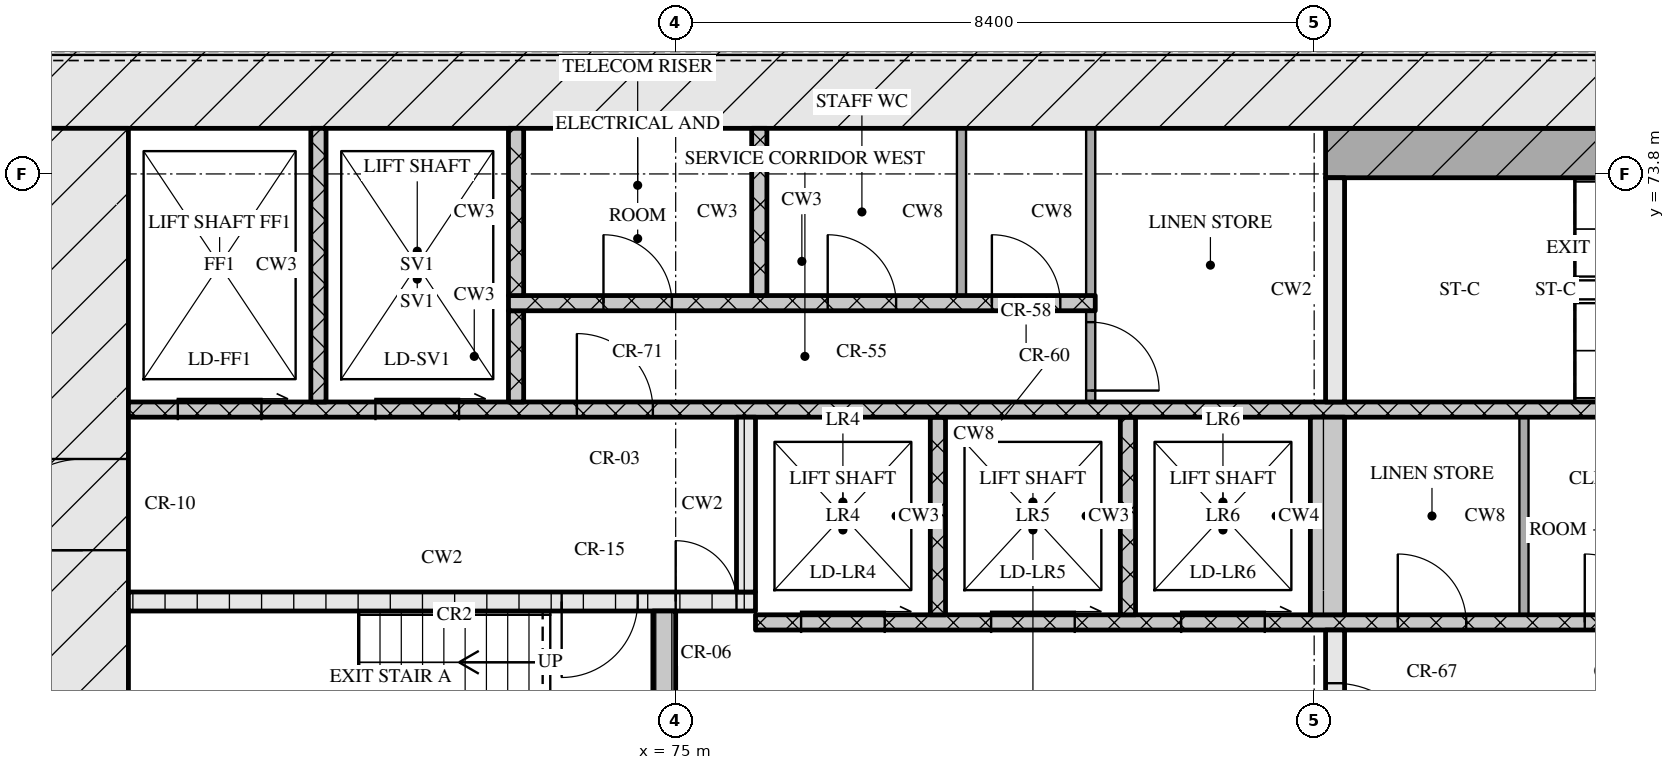
"""IFC4 building model, lengths in metres.
Left out: names, types, materials, properties, quantities, classifications, styles, units other than length and angle.
Written with IfcOpenShell. Run it as: python <this file> out.ifc"""

import sys

from ifc_helpers import new_model, si_unit, direction, frame, frame_2d, origin, place, context, subcontext, project, spatial, rectangle, extrude, element, fill, save


model = new_model("IFC4")
c1 = context("Model", 3, precision=1e-05, world=origin(), true_north=direction((0.0, 1.0)))
c2 = subcontext(c1, "Body", "Model", "MODEL_VIEW")
j1 = project(units=[si_unit("LENGTHUNIT", "METRE"), si_unit("PLANEANGLEUNIT", "RADIAN")], contexts=[c1])
p1 = place(None, origin())
s1 = spatial("IfcSite", under=j1, at=p1, CompositionType="ELEMENT")
p2 = place(p1, origin())
s2 = spatial("IfcBuilding", under=s1, at=p2, CompositionType="ELEMENT")
p3 = place(p2, frame((0.0, 0.0, 58.8)))
s3 = spatial("IfcBuildingStorey", under=s2, at=p3, CompositionType="ELEMENT", Elevation=58.8)
p4 = place(p3, frame((66.6, 75.0, 0.0), z_axis=(0.0, 0.0, 1.0), x_axis=(1.0, 0.0, 0.0)))
e1 = element("IfcWall", 1, at=p4, inside=s3, PredefinedType="SOLIDWALL", context=c2, shape_type="SweptSolid", body=[
    extrude(rectangle(XDim=42.0, YDim=1.2, at=frame_2d((21.0, 0.0))), origin(), (0.0, 0.0, 1.0), 3.32),
])
p5 = place(p3, frame((67.2, 62.4, 0.0), z_axis=(0.0, 0.0, 1.0), x_axis=(0.0, 1.0, 0.0)))
e2 = element("IfcWall", 2, at=p5, inside=s3, PredefinedType="SOLIDWALL", context=c2, shape_type="SweptSolid", body=[
    extrude(rectangle(XDim=12.0, YDim=1.2, at=frame_2d((6.0, 0.0))), origin(), (0.0, 0.0, 1.0), 3.32),
])
p6 = place(p5, frame((6.45, 0.0, 0.0)))
e3 = element("IfcOpeningElement", 3, at=p6, cuts=e2, PredefinedType="OPENING", context=c2, shape_type="SweptSolid", body=[
    extrude(rectangle(XDim=1.2, YDim=2.1, at=frame_2d((0.6, 1.05))), frame((0.0, 0.61, 0.0), z_axis=(0.0, -1.0, 0.0), x_axis=(1.0, 0.0, 0.0)), (0.0, 0.0, 1.0), 1.22),
])
p7 = place(p3, frame((74.85, 65.2, 0.0), z_axis=(0.0, 0.0, 1.0), x_axis=(0.0, 1.0, 0.0)))
e4 = element("IfcWall", 4, at=p7, inside=s3, PredefinedType="SOLIDWALL", context=c2, shape_type="SweptSolid", body=[
    extrude(rectangle(XDim=2.85, YDim=0.3, at=frame_2d((1.425, 0.0))), origin(), (0.0, 0.0, 1.0), 3.32),
])
p8 = place(p3, frame((83.675, 65.2, 0.0), z_axis=(0.0, 0.0, 1.0), x_axis=(0.0, 1.0, 0.0)))
e5 = element("IfcWall", 5, at=p8, inside=s3, PredefinedType="SOLIDWALL", context=c2, shape_type="SweptSolid", body=[
    extrude(rectangle(XDim=2.6, YDim=0.25, at=frame_2d((1.3, 0.0))), origin(), (0.0, 0.0, 1.0), 3.32),
])
p9 = place(p8, frame((0.7, 0.0, 0.0)))
e6 = element("IfcOpeningElement", 6, at=p9, cuts=e5, PredefinedType="OPENING", context=c2, shape_type="SweptSolid", body=[
    extrude(rectangle(XDim=1.2, YDim=2.1, at=frame_2d((0.6, 1.05))), frame((0.0, 0.135, 0.0), z_axis=(0.0, -1.0, 0.0), x_axis=(1.0, 0.0, 0.0)), (0.0, 0.0, 1.0), 0.27),
])
p10 = place(p3, frame((76.05, 67.9, 0.0), z_axis=(0.0, 0.0, 1.0), x_axis=(1.0, 0.0, 0.0)))
e7 = element("IfcWall", 7, at=p10, inside=s3, PredefinedType="SOLIDWALL", context=c2, shape_type="SweptSolid", body=[
    extrude(rectangle(XDim=23.1, YDim=0.2, at=frame_2d((11.55, 0.0))), origin(), (0.0, 0.0, 1.0), 3.32),
])
p11 = place(p10, frame((0.6, 0.0, 0.0)))
e8 = element("IfcOpeningElement", 8, at=p11, cuts=e7, PredefinedType="OPENING", context=c2, shape_type="SweptSolid", body=[
    extrude(rectangle(XDim=1.1, YDim=2.1, at=frame_2d((0.55, 1.05))), frame((0.0, 0.11, 0.0), z_axis=(0.0, -1.0, 0.0), x_axis=(1.0, 0.0, 0.0)), (0.0, 0.0, 1.0), 0.22),
])
p12 = place(p10, frame((3.1, 0.0, 0.0)))
e9 = element("IfcOpeningElement", 9, at=p12, cuts=e7, PredefinedType="OPENING", context=c2, shape_type="SweptSolid", body=[
    extrude(rectangle(XDim=1.1, YDim=2.1, at=frame_2d((0.55, 1.05))), frame((0.0, 0.11, 0.0), z_axis=(0.0, -1.0, 0.0), x_axis=(1.0, 0.0, 0.0)), (0.0, 0.0, 1.0), 0.22),
])
p13 = place(p10, frame((5.6, 0.0, 0.0)))
e10 = element("IfcOpeningElement", 10, at=p13, cuts=e7, PredefinedType="OPENING", context=c2, shape_type="SweptSolid", body=[
    extrude(rectangle(XDim=1.1, YDim=2.1, at=frame_2d((0.55, 1.05))), frame((0.0, 0.11, 0.0), z_axis=(0.0, -1.0, 0.0), x_axis=(1.0, 0.0, 0.0)), (0.0, 0.0, 1.0), 0.22),
])
p14 = place(p10, frame((8.45, 0.0, 0.0)))
e11 = element("IfcOpeningElement", 11, at=p14, cuts=e7, PredefinedType="OPENING", context=c2, shape_type="SweptSolid", body=[
    extrude(rectangle(XDim=0.9, YDim=2.1, at=frame_2d((0.45, 1.05))), frame((0.0, 0.11, 0.0), z_axis=(0.0, -1.0, 0.0), x_axis=(1.0, 0.0, 0.0)), (0.0, 0.0, 1.0), 0.22),
])
p15 = place(p10, frame((10.91, 0.0, 0.0)))
e12 = element("IfcOpeningElement", 12, at=p15, cuts=e7, PredefinedType="OPENING", context=c2, shape_type="SweptSolid", body=[
    extrude(rectangle(XDim=0.9, YDim=2.1, at=frame_2d((0.45, 1.05))), frame((0.0, 0.11, 0.0), z_axis=(0.0, -1.0, 0.0), x_axis=(1.0, 0.0, 0.0)), (0.0, 0.0, 1.0), 0.22),
])
p16 = place(p10, frame((13.55, 0.0, 0.0)))
e13 = element("IfcOpeningElement", 13, at=p16, cuts=e7, PredefinedType="OPENING", context=c2, shape_type="SweptSolid", body=[
    extrude(rectangle(XDim=1.0, YDim=2.1, at=frame_2d((0.5, 1.05))), frame((0.0, 0.11, 0.0), z_axis=(0.0, -1.0, 0.0), x_axis=(1.0, 0.0, 0.0)), (0.0, 0.0, 1.0), 0.22),
])
for number, where, z_axis, x_axis in (
    (14, (78.45, 68.0, 0.0), (0.0, 0.0, 1.0), (0.0, 1.0, 0.0)),
    (15, (80.95, 68.0, 0.0), (0.0, 0.0, 1.0), (0.0, 1.0, 0.0)),
):
    element("IfcWall", number, at=place(p3, frame(where, z_axis=z_axis, x_axis=x_axis)), inside=s3, PredefinedType="SOLIDWALL", context=c2, shape_type="SweptSolid", body=[
        extrude(rectangle(XDim=2.6, YDim=0.2, at=frame_2d((1.3, 0.0))), origin(), (0.0, 0.0, 1.0), 3.32),
    ])
p17 = place(p3, frame((83.575, 68.0, 0.0), z_axis=(0.0, 0.0, 1.0), x_axis=(0.0, 1.0, 0.0)))
e16 = element("IfcWall", 16, at=p17, inside=s3, PredefinedType="SOLIDWALL", context=c2, shape_type="SweptSolid", body=[
    extrude(rectangle(XDim=2.6, YDim=0.45, at=frame_2d((1.3, 0.0))), origin(), (0.0, 0.0, 1.0), 3.32),
])
p18 = place(p3, frame((86.16, 68.0, 0.0), z_axis=(0.0, 0.0, 1.0), x_axis=(0.0, 1.0, 0.0)))
e17 = element("IfcWall", 17, at=p18, inside=s3, PredefinedType="PARTITIONING", context=c2, shape_type="SweptSolid", body=[
    extrude(rectangle(XDim=2.6, YDim=0.12, at=frame_2d((1.3, 0.0))), origin(), (0.0, 0.0, 1.0), 3.32),
])
p19 = place(p3, frame((67.8, 68.175, 0.0), z_axis=(0.0, 0.0, 1.0), x_axis=(1.0, 0.0, 0.0)))
e18 = element("IfcWall", 18, at=p19, inside=s3, PredefinedType="SOLIDWALL", context=c2, shape_type="SweptSolid", body=[
    extrude(rectangle(XDim=8.25, YDim=0.25, at=frame_2d((4.125, 0.0))), origin(), (0.0, 0.0, 1.0), 3.32),
])
p20 = place(p19, frame((5.7, 0.0, 0.0)))
e19 = element("IfcOpeningElement", 19, at=p20, cuts=e18, PredefinedType="OPENING", context=c2, shape_type="SweptSolid", body=[
    extrude(rectangle(XDim=1.0, YDim=2.1, at=frame_2d((0.5, 1.05))), frame((0.0, 0.135, 0.0), z_axis=(0.0, -1.0, 0.0), x_axis=(1.0, 0.0, 0.0)), (0.0, 0.0, 1.0), 0.27),
])
p21 = place(p19, frame((7.2, 0.0, 0.0)))
e20 = element("IfcOpeningElement", 20, at=p21, cuts=e18, PredefinedType="OPENING", context=c2, shape_type="SweptSolid", body=[
    extrude(rectangle(XDim=0.8, YDim=2.1, at=frame_2d((0.4, 1.05))), frame((0.0, 0.135, 0.0), z_axis=(0.0, -1.0, 0.0), x_axis=(1.0, 0.0, 0.0)), (0.0, 0.0, 1.0), 0.27),
])
p22 = place(p3, frame((75.925, 68.3, 0.0), z_axis=(0.0, 0.0, 1.0), x_axis=(0.0, 1.0, 0.0)))
e21 = element("IfcWall", 21, at=p22, inside=s3, PredefinedType="SOLIDWALL", context=c2, shape_type="SweptSolid", body=[
    extrude(rectangle(XDim=2.3, YDim=0.25, at=frame_2d((1.15, 0.0))), origin(), (0.0, 0.0, 1.0), 3.32),
])
p23 = place(p3, frame((67.8, 70.7, 0.0), z_axis=(0.0, 0.0, 1.0), x_axis=(1.0, 0.0, 0.0)))
e22 = element("IfcWall", 22, at=p23, inside=s3, PredefinedType="SOLIDWALL", context=c2, shape_type="SweptSolid", body=[
    extrude(rectangle(XDim=39.6, YDim=0.2, at=frame_2d((19.8, 0.0))), origin(), (0.0, 0.0, 1.0), 3.32),
])
p24 = place(p23, frame((0.65, 0.0, 0.0)))
e23 = element("IfcOpeningElement", 23, at=p24, cuts=e22, PredefinedType="OPENING", context=c2, shape_type="SweptSolid", body=[
    extrude(rectangle(XDim=1.1, YDim=2.1, at=frame_2d((0.55, 1.05))), frame((0.0, 0.11, 0.0), z_axis=(0.0, -1.0, 0.0), x_axis=(1.0, 0.0, 0.0)), (0.0, 0.0, 1.0), 0.22),
])
p25 = place(p23, frame((3.25, 0.0, 0.0)))
e24 = element("IfcOpeningElement", 24, at=p25, cuts=e22, PredefinedType="OPENING", context=c2, shape_type="SweptSolid", body=[
    extrude(rectangle(XDim=1.1, YDim=2.1, at=frame_2d((0.55, 1.05))), frame((0.0, 0.11, 0.0), z_axis=(0.0, -1.0, 0.0), x_axis=(1.0, 0.0, 0.0)), (0.0, 0.0, 1.0), 0.22),
])
p26 = place(p23, frame((5.9, 0.0, 0.0)))
e25 = element("IfcOpeningElement", 25, at=p26, cuts=e22, PredefinedType="OPENING", context=c2, shape_type="SweptSolid", body=[
    extrude(rectangle(XDim=1.0, YDim=2.1, at=frame_2d((0.5, 1.05))), frame((0.0, 0.11, 0.0), z_axis=(0.0, -1.0, 0.0), x_axis=(1.0, 0.0, 0.0)), (0.0, 0.0, 1.0), 0.22),
])
p27 = place(p23, frame((21.7, 0.0, 0.0)))
e26 = element("IfcOpeningElement", 26, at=p27, cuts=e22, PredefinedType="OPENING", context=c2, shape_type="SweptSolid", body=[
    extrude(rectangle(XDim=1.0, YDim=2.1, at=frame_2d((0.5, 1.05))), frame((0.0, 0.11, 0.0), z_axis=(0.0, -1.0, 0.0), x_axis=(1.0, 0.0, 0.0)), (0.0, 0.0, 1.0), 0.22),
])
p28 = place(p23, frame((32.7, 0.0, 0.0)))
e27 = element("IfcOpeningElement", 27, at=p28, cuts=e22, PredefinedType="OPENING", context=c2, shape_type="SweptSolid", body=[
    extrude(rectangle(XDim=1.0, YDim=2.1, at=frame_2d((0.5, 1.05))), frame((0.0, 0.11, 0.0), z_axis=(0.0, -1.0, 0.0), x_axis=(1.0, 0.0, 0.0)), (0.0, 0.0, 1.0), 0.22),
])
p29 = place(p23, frame((35.25, 0.0, 0.0)))
e28 = element("IfcOpeningElement", 28, at=p29, cuts=e22, PredefinedType="OPENING", context=c2, shape_type="SweptSolid", body=[
    extrude(rectangle(XDim=1.1, YDim=2.1, at=frame_2d((0.55, 1.05))), frame((0.0, 0.11, 0.0), z_axis=(0.0, -1.0, 0.0), x_axis=(1.0, 0.0, 0.0)), (0.0, 0.0, 1.0), 0.22),
])
p30 = place(p23, frame((37.85, 0.0, 0.0)))
e29 = element("IfcOpeningElement", 29, at=p30, cuts=e22, PredefinedType="OPENING", context=c2, shape_type="SweptSolid", body=[
    extrude(rectangle(XDim=1.1, YDim=2.1, at=frame_2d((0.55, 1.05))), frame((0.0, 0.11, 0.0), z_axis=(0.0, -1.0, 0.0), x_axis=(1.0, 0.0, 0.0)), (0.0, 0.0, 1.0), 0.22),
])
p31 = place(p3, frame((70.3, 70.8, 0.0), z_axis=(0.0, 0.0, 1.0), x_axis=(0.0, 1.0, 0.0)))
e30 = element("IfcWall", 30, at=p31, inside=s3, PredefinedType="SOLIDWALL", context=c2, shape_type="SweptSolid", body=[
    extrude(rectangle(XDim=3.6, YDim=0.2, at=frame_2d((1.8, 0.0))), origin(), (0.0, 0.0, 1.0), 3.32),
])
p32 = place(p3, frame((72.9, 70.8, 0.0), z_axis=(0.0, 0.0, 1.0), x_axis=(0.0, 1.0, 0.0)))
e31 = element("IfcWall", 31, at=p32, inside=s3, PredefinedType="SOLIDWALL", context=c2, shape_type="SweptSolid", body=[
    extrude(rectangle(XDim=1.2, YDim=0.2, at=frame_2d((0.6, 0.0))), origin(), (0.0, 0.0, 1.0), 3.32),
])
p33 = place(p3, frame((80.46, 70.8, 0.0), z_axis=(0.0, 0.0, 1.0), x_axis=(0.0, 1.0, 0.0)))
e32 = element("IfcWall", 32, at=p33, inside=s3, PredefinedType="PARTITIONING", context=c2, shape_type="SweptSolid", body=[
    extrude(rectangle(XDim=1.2, YDim=0.12, at=frame_2d((0.6, 0.0))), origin(), (0.0, 0.0, 1.0), 3.32),
])
p34 = place(p33, frame((0.15, 0.0, 0.0)))
e33 = element("IfcOpeningElement", 33, at=p34, cuts=e32, PredefinedType="OPENING", context=c2, shape_type="SweptSolid", body=[
    extrude(rectangle(XDim=0.9, YDim=2.1, at=frame_2d((0.45, 1.05))), frame((0.0, 0.07, 0.0), z_axis=(0.0, -1.0, 0.0), x_axis=(1.0, 0.0, 0.0)), (0.0, 0.0, 1.0), 0.14),
])
p35 = place(p3, frame((83.675, 70.8, 0.0), z_axis=(0.0, 0.0, 1.0), x_axis=(0.0, 1.0, 0.0)))
e34 = element("IfcWall", 34, at=p35, inside=s3, PredefinedType="SOLIDWALL", context=c2, shape_type="SweptSolid", body=[
    extrude(rectangle(XDim=2.95, YDim=0.25, at=frame_2d((1.475, 0.0))), origin(), (0.0, 0.0, 1.0), 3.32),
])
p36 = place(p3, frame((72.8, 72.1, 0.0), z_axis=(0.0, 0.0, 1.0), x_axis=(1.0, 0.0, 0.0)))
e35 = element("IfcWall", 35, at=p36, inside=s3, PredefinedType="SOLIDWALL", context=c2, shape_type="SweptSolid", body=[
    extrude(rectangle(XDim=7.72, YDim=0.2, at=frame_2d((3.86, 0.0))), origin(), (0.0, 0.0, 1.0), 3.32),
])
p37 = place(p36, frame((1.25, 0.0, 0.0)))
e36 = element("IfcOpeningElement", 36, at=p37, cuts=e35, PredefinedType="OPENING", context=c2, shape_type="SweptSolid", body=[
    extrude(rectangle(XDim=0.9, YDim=2.1, at=frame_2d((0.45, 1.05))), frame((0.0, 0.11, 0.0), z_axis=(0.0, -1.0, 0.0), x_axis=(1.0, 0.0, 0.0)), (0.0, 0.0, 1.0), 0.22),
])
p38 = place(p36, frame((4.2, 0.0, 0.0)))
e37 = element("IfcOpeningElement", 37, at=p38, cuts=e35, PredefinedType="OPENING", context=c2, shape_type="SweptSolid", body=[
    extrude(rectangle(XDim=0.9, YDim=2.1, at=frame_2d((0.45, 1.05))), frame((0.0, 0.11, 0.0), z_axis=(0.0, -1.0, 0.0), x_axis=(1.0, 0.0, 0.0)), (0.0, 0.0, 1.0), 0.22),
])
p39 = place(p36, frame((6.36, 0.0, 0.0)))
e38 = element("IfcOpeningElement", 38, at=p39, cuts=e35, PredefinedType="OPENING", context=c2, shape_type="SweptSolid", body=[
    extrude(rectangle(XDim=0.9, YDim=2.1, at=frame_2d((0.45, 1.05))), frame((0.0, 0.11, 0.0), z_axis=(0.0, -1.0, 0.0), x_axis=(1.0, 0.0, 0.0)), (0.0, 0.0, 1.0), 0.22),
])
for number, where, z_axis, x_axis in (
    (39, (72.9, 72.2, 0.0), (0.0, 0.0, 1.0), (0.0, 1.0, 0.0)),
    (40, (76.1, 72.2, 0.0), (0.0, 0.0, 1.0), (0.0, 1.0, 0.0)),
):
    element("IfcWall", number, at=place(p3, frame(where, z_axis=z_axis, x_axis=x_axis)), inside=s3, PredefinedType="SOLIDWALL", context=c2, shape_type="SweptSolid", body=[
        extrude(rectangle(XDim=2.2, YDim=0.2, at=frame_2d((1.1, 0.0))), origin(), (0.0, 0.0, 1.0), 3.32),
    ])
for number, where, z_axis, x_axis in (
    (41, (78.76, 72.2, 0.0), (0.0, 0.0, 1.0), (0.0, 1.0, 0.0)),
    (42, (80.46, 72.2, 0.0), (0.0, 0.0, 1.0), (0.0, 1.0, 0.0)),
):
    element("IfcWall", number, at=place(p3, frame(where, z_axis=z_axis, x_axis=x_axis)), inside=s3, PredefinedType="PARTITIONING", context=c2, shape_type="SweptSolid", body=[
        extrude(rectangle(XDim=2.2, YDim=0.12, at=frame_2d((1.1, 0.0))), origin(), (0.0, 0.0, 1.0), 3.32),
    ])
p40 = place(p3, frame((83.55, 74.075, 0.0), z_axis=(0.0, 0.0, 1.0), x_axis=(1.0, 0.0, 0.0)))
e43 = element("IfcWall", 43, at=p40, inside=s3, PredefinedType="SOLIDWALL", context=c2, shape_type="SweptSolid", body=[
    extrude(rectangle(XDim=8.1, YDim=0.65, at=frame_2d((4.05, 0.0))), origin(), (0.0, 0.0, 1.0), 3.32),
])
p41 = place(p9, origin())
e44 = element("IfcDoor", 44, at=p41, inside=s3, OperationType="SINGLE_SWING_RIGHT", PredefinedType="DOOR", context=c2, shape_type="SweptSolid", body=[
    extrude(rectangle(XDim=1.2, YDim=2.1, at=frame_2d((0.6, 1.05))), frame((0.0, 0.025, 0.0), z_axis=(0.0, -1.0, 0.0), x_axis=(1.0, 0.0, 0.0)), (0.0, 0.0, 1.0), 0.05),
])
fill(e6, e44)
p42 = place(p11, origin())
e45 = element("IfcDoor", 45, at=p42, inside=s3, OperationType="SLIDING_TO_RIGHT", PredefinedType="DOOR", context=c2, shape_type="SweptSolid", body=[
    extrude(rectangle(XDim=1.1, YDim=2.1, at=frame_2d((0.55, 1.05))), frame((0.0, 0.025, 0.0), z_axis=(0.0, -1.0, 0.0), x_axis=(1.0, 0.0, 0.0)), (0.0, 0.0, 1.0), 0.05),
])
fill(e8, e45)
p43 = place(p12, origin())
e46 = element("IfcDoor", 46, at=p43, inside=s3, OperationType="SLIDING_TO_RIGHT", PredefinedType="DOOR", context=c2, shape_type="SweptSolid", body=[
    extrude(rectangle(XDim=1.1, YDim=2.1, at=frame_2d((0.55, 1.05))), frame((0.0, 0.025, 0.0), z_axis=(0.0, -1.0, 0.0), x_axis=(1.0, 0.0, 0.0)), (0.0, 0.0, 1.0), 0.05),
])
fill(e9, e46)
p44 = place(p13, origin())
e47 = element("IfcDoor", 47, at=p44, inside=s3, OperationType="SLIDING_TO_RIGHT", PredefinedType="DOOR", context=c2, shape_type="SweptSolid", body=[
    extrude(rectangle(XDim=1.1, YDim=2.1, at=frame_2d((0.55, 1.05))), frame((0.0, 0.025, 0.0), z_axis=(0.0, -1.0, 0.0), x_axis=(1.0, 0.0, 0.0)), (0.0, 0.0, 1.0), 0.05),
])
fill(e10, e47)
p45 = place(p14, origin())
e48 = element("IfcDoor", 48, at=p45, inside=s3, OperationType="SINGLE_SWING_LEFT", PredefinedType="DOOR", context=c2, shape_type="SweptSolid", body=[
    extrude(rectangle(XDim=0.9, YDim=2.1, at=frame_2d((0.45, 1.05))), frame((0.0, 0.025, 0.0), z_axis=(0.0, -1.0, 0.0), x_axis=(1.0, 0.0, 0.0)), (0.0, 0.0, 1.0), 0.05),
])
fill(e11, e48)
p46 = place(p15, origin())
e49 = element("IfcDoor", 49, at=p46, inside=s3, OperationType="SINGLE_SWING_LEFT", PredefinedType="DOOR", context=c2, shape_type="SweptSolid", body=[
    extrude(rectangle(XDim=0.9, YDim=2.1, at=frame_2d((0.45, 1.05))), frame((0.0, 0.025, 0.0), z_axis=(0.0, -1.0, 0.0), x_axis=(1.0, 0.0, 0.0)), (0.0, 0.0, 1.0), 0.05),
])
fill(e12, e49)
p47 = place(p20, origin())
e50 = element("IfcDoor", 50, at=p47, inside=s3, OperationType="SINGLE_SWING_RIGHT", PredefinedType="DOOR", context=c2, shape_type="SweptSolid", body=[
    extrude(rectangle(XDim=1.0, YDim=2.1, at=frame_2d((0.5, 1.05))), frame((0.0, 0.025, 0.0), z_axis=(0.0, -1.0, 0.0), x_axis=(1.0, 0.0, 0.0)), (0.0, 0.0, 1.0), 0.05),
])
fill(e19, e50)
p48 = place(p21, origin())
e51 = element("IfcDoor", 51, at=p48, inside=s3, OperationType="SINGLE_SWING_LEFT", PredefinedType="DOOR", context=c2, shape_type="SweptSolid", body=[
    extrude(rectangle(XDim=0.8, YDim=2.1, at=frame_2d((0.4, 1.05))), frame((0.0, 0.025, 0.0), z_axis=(0.0, -1.0, 0.0), x_axis=(1.0, 0.0, 0.0)), (0.0, 0.0, 1.0), 0.05),
])
fill(e20, e51)
p49 = place(p6, origin())
e52 = element("IfcDoor", 52, at=p49, inside=s3, OperationType="SINGLE_SWING_LEFT", PredefinedType="DOOR", context=c2, shape_type="SweptSolid", body=[
    extrude(rectangle(XDim=1.2, YDim=2.1, at=frame_2d((0.6, 1.05))), frame((0.0, 0.025, 0.0), z_axis=(0.0, -1.0, 0.0), x_axis=(1.0, 0.0, 0.0)), (0.0, 0.0, 1.0), 0.05),
])
fill(e3, e52)
p50 = place(p24, origin())
e53 = element("IfcDoor", 53, at=p50, inside=s3, OperationType="SLIDING_TO_RIGHT", PredefinedType="DOOR", context=c2, shape_type="SweptSolid", body=[
    extrude(rectangle(XDim=1.1, YDim=2.1, at=frame_2d((0.55, 1.05))), frame((0.0, 0.025, 0.0), z_axis=(0.0, -1.0, 0.0), x_axis=(1.0, 0.0, 0.0)), (0.0, 0.0, 1.0), 0.05),
])
fill(e23, e53)
p51 = place(p25, origin())
e54 = element("IfcDoor", 54, at=p51, inside=s3, OperationType="SLIDING_TO_RIGHT", PredefinedType="DOOR", context=c2, shape_type="SweptSolid", body=[
    extrude(rectangle(XDim=1.1, YDim=2.1, at=frame_2d((0.55, 1.05))), frame((0.0, 0.025, 0.0), z_axis=(0.0, -1.0, 0.0), x_axis=(1.0, 0.0, 0.0)), (0.0, 0.0, 1.0), 0.05),
])
fill(e24, e54)
p52 = place(p26, origin())
e55 = element("IfcDoor", 55, at=p52, inside=s3, OperationType="SINGLE_SWING_LEFT", PredefinedType="DOOR", context=c2, shape_type="SweptSolid", body=[
    extrude(rectangle(XDim=1.0, YDim=2.1, at=frame_2d((0.5, 1.05))), frame((0.0, 0.025, 0.0), z_axis=(0.0, -1.0, 0.0), x_axis=(1.0, 0.0, 0.0)), (0.0, 0.0, 1.0), 0.05),
])
fill(e25, e55)
p53 = place(p34, origin())
e56 = element("IfcDoor", 56, at=p53, inside=s3, OperationType="SINGLE_SWING_RIGHT", PredefinedType="DOOR", context=c2, shape_type="SweptSolid", body=[
    extrude(rectangle(XDim=0.9, YDim=2.1, at=frame_2d((0.45, 1.05))), frame((0.0, 0.025, 0.0), z_axis=(0.0, -1.0, 0.0), x_axis=(1.0, 0.0, 0.0)), (0.0, 0.0, 1.0), 0.05),
])
fill(e33, e56)
p54 = place(p37, origin())
e57 = element("IfcDoor", 57, at=p54, inside=s3, OperationType="SINGLE_SWING_LEFT", PredefinedType="DOOR", context=c2, shape_type="SweptSolid", body=[
    extrude(rectangle(XDim=0.9, YDim=2.1, at=frame_2d((0.45, 1.05))), frame((0.0, 0.025, 0.0), z_axis=(0.0, -1.0, 0.0), x_axis=(1.0, 0.0, 0.0)), (0.0, 0.0, 1.0), 0.05),
])
fill(e36, e57)
p55 = place(p38, origin())
e58 = element("IfcDoor", 58, at=p55, inside=s3, OperationType="SINGLE_SWING_LEFT", PredefinedType="DOOR", context=c2, shape_type="SweptSolid", body=[
    extrude(rectangle(XDim=0.9, YDim=2.1, at=frame_2d((0.45, 1.05))), frame((0.0, 0.025, 0.0), z_axis=(0.0, -1.0, 0.0), x_axis=(1.0, 0.0, 0.0)), (0.0, 0.0, 1.0), 0.05),
])
fill(e37, e58)
p56 = place(p39, origin())
e59 = element("IfcDoor", 59, at=p56, inside=s3, OperationType="SINGLE_SWING_LEFT", PredefinedType="DOOR", context=c2, shape_type="SweptSolid", body=[
    extrude(rectangle(XDim=0.9, YDim=2.1, at=frame_2d((0.45, 1.05))), frame((0.0, 0.025, 0.0), z_axis=(0.0, -1.0, 0.0), x_axis=(1.0, 0.0, 0.0)), (0.0, 0.0, 1.0), 0.05),
])
fill(e38, e59)
save(model, sys.argv[1])
